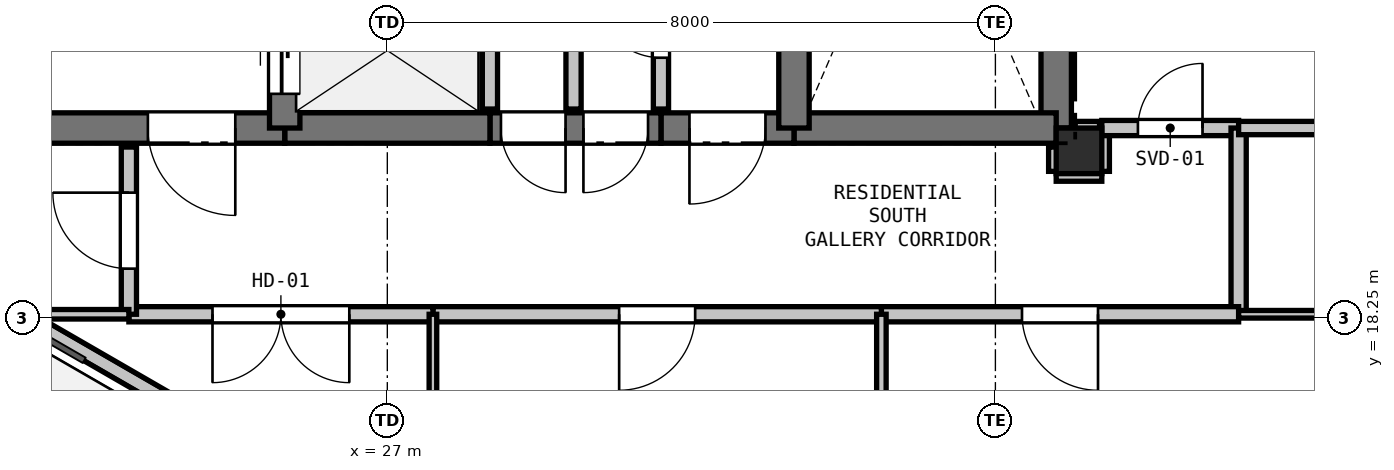
"""IFC4 building model, lengths in metres.
Left out: names, types, materials, properties, quantities, classifications, styles, units other than length and angle.
Written with IfcOpenShell. Run it as: python <this file> out.ifc"""

import sys

from ifc_helpers import new_model, si_unit, direction, frame, frame_2d, origin, origin_2d, place, context, subcontext, project, spatial, rectangle, extrude, element, fill, save


model = new_model("IFC4")
c1 = context("Model", 3, precision=1e-05, world=origin(), true_north=direction((0.0, 1.0)))
c2 = subcontext(c1, "Body", "Model", "MODEL_VIEW")
j1 = project(units=[si_unit("LENGTHUNIT", "METRE"), si_unit("PLANEANGLEUNIT", "RADIAN")], contexts=[c1])
p1 = place(None, origin())
s1 = spatial("IfcSite", under=j1, at=p1, CompositionType="ELEMENT")
p2 = place(p1, origin())
s2 = spatial("IfcBuilding", under=s1, at=p2, CompositionType="ELEMENT")
p3 = place(p2, frame((0.0, 0.0, 243.0)))
s3 = spatial("IfcBuildingStorey", under=s2, at=p3, CompositionType="ELEMENT", Elevation=243.0)
p4 = place(p3, frame((36.1, 20.45, 0.0), z_axis=(0.0, 0.0, 1.0), x_axis=(1.0, 0.0, 0.0)))
e1 = element("IfcColumn", 1, at=p4, inside=s3, PredefinedType="COLUMN", context=c2, shape_type="SweptSolid", body=[
    extrude(rectangle(XDim=0.6, YDim=0.6, at=origin_2d()), origin(), (0.0, 0.0, 1.0), 3.3),
])
p5 = place(p3, frame((27.191, 15.389, 0.0), z_axis=(0.0, 0.0, 1.0), x_axis=(-0.866019557082, 0.500010126649, 0.0)))
e2 = element("IfcWall", 2, at=p5, inside=s3, PredefinedType="PARAPET", context=c2, shape_type="SweptSolid", body=[
    extrude(rectangle(XDim=8.228, YDim=0.2, at=frame_2d((4.114, 0.0))), origin(), (0.0, 0.0, 1.0), 0.2),
])
p6 = place(p3, frame((35.8, 28.1, 0.0), z_axis=(0.0, 0.0, 1.0), x_axis=(0.0, -1.0, 0.0)))
e3 = element("IfcWall", 3, at=p6, inside=s3, PredefinedType="SHEAR", context=c2, shape_type="SweptSolid", body=[
    extrude(rectangle(XDim=7.35, YDim=0.4, at=frame_2d((3.675, 0.0))), origin(), (0.0, 0.0, 1.0), 3.08),
])
p7 = place(p3, frame((35.8, 20.75, 0.0), z_axis=(0.0, 0.0, 1.0), x_axis=(-1.0, 0.0, 0.0)))
e4 = element("IfcWall", 4, at=p7, inside=s3, PredefinedType="SHEAR", context=c2, shape_type="SweptSolid", body=[
    extrude(rectangle(XDim=3.45, YDim=0.4, at=frame_2d((1.725, 0.0))), origin(), (0.0, 0.0, 1.0), 3.08),
])
p8 = place(p3, frame((32.35, 20.75, 0.0), z_axis=(0.0, 0.0, 1.0), x_axis=(-1.0, 0.0, 0.0)))
e5 = element("IfcWall", 5, at=p8, inside=s3, PredefinedType="SHEAR", context=c2, shape_type="SweptSolid", body=[
    extrude(rectangle(XDim=1.75, YDim=0.4, at=frame_2d((0.875, 0.0))), origin(), (0.0, 0.0, 1.0), 3.08),
])
p9 = place(p8, frame((0.375, 0.0, 0.0)))
e6 = element("IfcOpeningElement", 6, at=p9, cuts=e5, PredefinedType="OPENING", context=c2, shape_type="SweptSolid", body=[
    extrude(rectangle(XDim=1.0, YDim=2.15, at=frame_2d((0.5, 1.075))), frame((0.0, 0.21, 0.0), z_axis=(0.0, -1.0, 0.0), x_axis=(1.0, 0.0, 0.0)), (0.0, 0.0, 1.0), 0.42),
])
p10 = place(p3, frame((30.6, 20.75, 0.0), z_axis=(0.0, 0.0, 1.0), x_axis=(-1.0, 0.0, 0.0)))
e7 = element("IfcWall", 7, at=p10, inside=s3, PredefinedType="SHEAR", context=c2, shape_type="SweptSolid", body=[
    extrude(rectangle(XDim=2.25, YDim=0.4, at=frame_2d((1.125, 0.0))), origin(), (0.0, 0.0, 1.0), 3.08),
])
p11 = place(p10, frame((1.255, 0.0, 0.0)))
e8 = element("IfcOpeningElement", 8, at=p11, cuts=e7, PredefinedType="OPENING", context=c2, shape_type="SweptSolid", body=[
    extrude(rectangle(XDim=0.85, YDim=2.1, at=frame_2d((0.425, 1.05))), frame((0.0, 0.21, 0.0), z_axis=(0.0, -1.0, 0.0), x_axis=(1.0, 0.0, 0.0)), (0.0, 0.0, 1.0), 0.42),
])
p12 = place(p10, frame((0.17, 0.0, 0.0)))
e9 = element("IfcOpeningElement", 9, at=p12, cuts=e7, PredefinedType="OPENING", context=c2, shape_type="SweptSolid", body=[
    extrude(rectangle(XDim=0.85, YDim=2.1, at=frame_2d((0.425, 1.05))), frame((0.0, 0.21, 0.0), z_axis=(0.0, -1.0, 0.0), x_axis=(1.0, 0.0, 0.0)), (0.0, 0.0, 1.0), 0.42),
])
p13 = place(p3, frame((28.35, 20.75, 0.0), z_axis=(0.0, 0.0, 1.0), x_axis=(-1.0, 0.0, 0.0)))
e10 = element("IfcWall", 10, at=p13, inside=s3, PredefinedType="SHEAR", context=c2, shape_type="SweptSolid", body=[
    extrude(rectangle(XDim=2.7, YDim=0.4, at=frame_2d((1.35, 0.0))), origin(), (0.0, 0.0, 1.0), 3.08),
])
p14 = place(p3, frame((25.65, 20.75, 0.0), z_axis=(0.0, 0.0, 1.0), x_axis=(-1.0, 0.0, 0.0)))
e11 = element("IfcWall", 11, at=p14, inside=s3, PredefinedType="SHEAR", context=c2, shape_type="SweptSolid", body=[
    extrude(rectangle(XDim=3.45, YDim=0.4, at=frame_2d((1.725, 0.0))), origin(), (0.0, 0.0, 1.0), 3.08),
])
p15 = place(p14, frame((0.65, 0.0, 0.0)))
e12 = element("IfcOpeningElement", 12, at=p15, cuts=e11, PredefinedType="OPENING", context=c2, shape_type="SweptSolid", body=[
    extrude(rectangle(XDim=1.15, YDim=2.15, at=frame_2d((0.575, 1.075))), frame((0.0, 0.21, 0.0), z_axis=(0.0, -1.0, 0.0), x_axis=(1.0, 0.0, 0.0)), (0.0, 0.0, 1.0), 0.42),
])
p16 = place(p3, frame((25.65, 20.75, 0.0), z_axis=(0.0, 0.0, 1.0), x_axis=(0.0, 1.0, 0.0)))
e13 = element("IfcWall", 13, at=p16, inside=s3, PredefinedType="SHEAR", context=c2, shape_type="SweptSolid", body=[
    extrude(rectangle(XDim=2.0, YDim=0.4, at=frame_2d((1.0, 0.0))), origin(), (0.0, 0.0, 1.0), 3.08),
])
p17 = place(p16, frame((0.45, 0.0, 0.0)))
e14 = element("IfcOpeningElement", 14, at=p17, cuts=e13, PredefinedType="OPENING", context=c2, shape_type="SweptSolid", body=[
    extrude(rectangle(XDim=1.1, YDim=2.15, at=frame_2d((0.55, 1.075))), frame((0.0, 0.21, 0.0), z_axis=(0.0, -1.0, 0.0), x_axis=(1.0, 0.0, 0.0)), (0.0, 0.0, 1.0), 0.42),
])
p18 = place(p3, frame((32.35, 20.75, 0.0), z_axis=(0.0, 0.0, 1.0), x_axis=(0.0, 1.0, 0.0)))
e15 = element("IfcWall", 15, at=p18, inside=s3, PredefinedType="SHEAR", context=c2, shape_type="SweptSolid", body=[
    extrude(rectangle(XDim=4.8, YDim=0.4, at=frame_2d((2.4, 0.0))), origin(), (0.0, 0.0, 1.0), 3.08),
])
p19 = place(p3, frame((28.35, 23.2, 0.0), z_axis=(0.0, 0.0, 1.0), x_axis=(0.0, -1.0, 0.0)))
e16 = element("IfcWall", 16, at=p19, inside=s3, PredefinedType="PARTITIONING", context=c2, shape_type="SweptSolid", body=[
    extrude(rectangle(XDim=2.2, YDim=0.2, at=frame_2d((1.1, 0.0))), origin(), (0.0, 0.0, 1.0), 3.08),
])
p20 = place(p3, frame((30.6, 21.0, 0.0), z_axis=(0.0, 0.0, 1.0), x_axis=(0.0, 1.0, 0.0)))
e17 = element("IfcWall", 17, at=p20, inside=s3, PredefinedType="PARTITIONING", context=c2, shape_type="SweptSolid", body=[
    extrude(rectangle(XDim=2.2, YDim=0.2, at=frame_2d((1.1, 0.0))), origin(), (0.0, 0.0, 1.0), 3.08),
])
p21 = place(p20, frame((0.675, 0.0, 0.0)))
e18 = element("IfcOpeningElement", 18, at=p21, cuts=e17, PredefinedType="OPENING", context=c2, shape_type="SweptSolid", body=[
    extrude(rectangle(XDim=0.85, YDim=2.1, at=frame_2d((0.425, 1.05))), frame((0.0, 0.11, 0.0), z_axis=(0.0, -1.0, 0.0), x_axis=(1.0, 0.0, 0.0)), (0.0, 0.0, 1.0), 0.22),
])
p22 = place(p3, frame((35.8, 20.15, 0.0), z_axis=(0.0, 0.0, 1.0), x_axis=(1.0, 0.0, 0.0)))
e19 = element("IfcWall", 19, at=p22, inside=s3, PredefinedType="PARTITIONING", context=c2, shape_type="SweptSolid", body=[
    extrude(rectangle(XDim=0.6, YDim=0.2, at=frame_2d((0.3, 0.0))), origin(), (0.0, 0.0, 1.0), 2.528),
])
p23 = place(p3, frame((36.4, 20.18, 0.0), z_axis=(0.0, 0.0, 1.0), x_axis=(0.0, 1.0, 0.0)))
e20 = element("IfcWall", 20, at=p23, inside=s3, PredefinedType="PARTITIONING", context=c2, shape_type="SweptSolid", body=[
    extrude(rectangle(XDim=0.57, YDim=0.2, at=frame_2d((0.285, 0.0))), origin(), (0.0, 0.0, 1.0), 3.08),
])
p24 = place(p3, frame((36.4, 20.75, 0.0), z_axis=(0.0, 0.0, 1.0), x_axis=(1.0, 0.0, 0.0)))
e21 = element("IfcWall", 21, at=p24, inside=s3, PredefinedType="PARTITIONING", context=c2, shape_type="SweptSolid", body=[
    extrude(rectangle(XDim=1.8, YDim=0.2, at=frame_2d((0.9, 0.0))), origin(), (0.0, 0.0, 1.0), 3.08),
])
p25 = place(p24, frame((0.475, 0.0, 0.0)))
e22 = element("IfcOpeningElement", 22, at=p25, cuts=e21, PredefinedType="OPENING", context=c2, shape_type="SweptSolid", body=[
    extrude(rectangle(XDim=0.85, YDim=2.1, at=frame_2d((0.425, 1.05))), frame((0.0, 0.11, 0.0), z_axis=(0.0, -1.0, 0.0), x_axis=(1.0, 0.0, 0.0)), (0.0, 0.0, 1.0), 0.22),
])
p26 = place(p3, frame((38.2, 20.75, 0.0), z_axis=(0.0, 0.0, 1.0), x_axis=(0.0, -1.0, 0.0)))
e23 = element("IfcWall", 23, at=p26, inside=s3, PredefinedType="PARTITIONING", context=c2, shape_type="SweptSolid", body=[
    extrude(rectangle(XDim=2.45, YDim=0.2, at=frame_2d((1.225, 0.0))), origin(), (0.0, 0.0, 1.0), 3.08),
])
p27 = place(p3, frame((38.2, 18.3, 0.0), z_axis=(0.0, 0.0, 1.0), x_axis=(-1.0, 0.0, 0.0)))
e24 = element("IfcWall", 24, at=p27, inside=s3, PredefinedType="PARTITIONING", context=c2, shape_type="SweptSolid", body=[
    extrude(rectangle(XDim=4.7, YDim=0.2, at=frame_2d((2.35, 0.0))), origin(), (0.0, 0.0, 1.0), 2.528),
])
p28 = place(p27, frame((1.85, 0.0, 0.0)))
e25 = element("IfcOpeningElement", 25, at=p28, cuts=e24, PredefinedType="OPENING", context=c2, shape_type="SweptSolid", body=[
    extrude(rectangle(XDim=1.0, YDim=2.15, at=frame_2d((0.5, 1.075))), frame((0.0, 0.11, 0.0), z_axis=(0.0, -1.0, 0.0), x_axis=(1.0, 0.0, 0.0)), (0.0, 0.0, 1.0), 0.22),
])
p29 = place(p3, frame((33.5, 18.3, 0.0), z_axis=(0.0, 0.0, 1.0), x_axis=(-1.0, 0.0, 0.0)))
e26 = element("IfcWall", 26, at=p29, inside=s3, PredefinedType="PARTITIONING", context=c2, shape_type="SweptSolid", body=[
    extrude(rectangle(XDim=5.9, YDim=0.2, at=frame_2d((2.95, 0.0))), origin(), (0.0, 0.0, 1.0), 3.08),
])
p30 = place(p29, frame((2.45, 0.0, 0.0)))
e27 = element("IfcOpeningElement", 27, at=p30, cuts=e26, PredefinedType="OPENING", context=c2, shape_type="SweptSolid", body=[
    extrude(rectangle(XDim=1.0, YDim=2.15, at=frame_2d((0.5, 1.075))), frame((0.0, 0.11, 0.0), z_axis=(0.0, -1.0, 0.0), x_axis=(1.0, 0.0, 0.0)), (0.0, 0.0, 1.0), 0.22),
])
p31 = place(p3, frame((27.6, 18.3, 0.0), z_axis=(0.0, 0.0, 1.0), x_axis=(-1.0, 0.0, 0.0)))
e28 = element("IfcWall", 28, at=p31, inside=s3, PredefinedType="PARTITIONING", context=c2, shape_type="SweptSolid", body=[
    extrude(rectangle(XDim=4.0, YDim=0.2, at=frame_2d((2.0, 0.0))), origin(), (0.0, 0.0, 1.0), 2.365),
])
p32 = place(p31, frame((1.1, 0.0, 0.0)))
e29 = element("IfcOpeningElement", 29, at=p32, cuts=e28, PredefinedType="OPENING", context=c2, shape_type="SweptSolid", body=[
    extrude(rectangle(XDim=1.8, YDim=2.2, at=frame_2d((0.9, 1.1))), frame((0.0, 0.11, 0.0), z_axis=(0.0, -1.0, 0.0), x_axis=(1.0, 0.0, 0.0)), (0.0, 0.0, 1.0), 0.22),
])
p33 = place(p3, frame((23.6, 18.3, 0.0), z_axis=(0.0, 0.0, 1.0), x_axis=(0.0, 1.0, 0.0)))
e30 = element("IfcWall", 30, at=p33, inside=s3, PredefinedType="PARTITIONING", context=c2, shape_type="SweptSolid", body=[
    extrude(rectangle(XDim=2.2, YDim=0.2, at=frame_2d((1.1, 0.0))), origin(), (0.0, 0.0, 1.0), 2.528),
])
p34 = place(p33, frame((0.6, 0.0, 0.0)))
e31 = element("IfcOpeningElement", 31, at=p34, cuts=e30, PredefinedType="OPENING", context=c2, shape_type="SweptSolid", body=[
    extrude(rectangle(XDim=1.0, YDim=2.15, at=frame_2d((0.5, 1.075))), frame((0.0, 0.11, 0.0), z_axis=(0.0, -1.0, 0.0), x_axis=(1.0, 0.0, 0.0)), (0.0, 0.0, 1.0), 0.22),
])
p35 = place(p3, frame((35.8, 20.5, 0.0), z_axis=(0.0, 0.0, 1.0), x_axis=(0.0, -1.0, 0.0)))
e32 = element("IfcWall", 32, at=p35, inside=s3, PredefinedType="PARTITIONING", context=c2, shape_type="SweptSolid", body=[
    extrude(rectangle(XDim=0.32, YDim=0.2, at=frame_2d((0.16, 0.0))), origin(), (0.0, 0.0, 1.0), 2.605),
])
p36 = place(p3, frame((39.606, 20.75, 0.0), z_axis=(0.0, 0.0, 1.0), x_axis=(-1.0, 0.0, 0.0)))
e33 = element("IfcWall", 33, at=p36, inside=s3, PredefinedType="PLUMBINGWALL", context=c2, shape_type="SweptSolid", body=[
    extrude(rectangle(XDim=1.406, YDim=0.175, at=frame_2d((0.703, 0.0))), origin(), (0.0, 0.0, 1.0), 2.365),
])
p37 = place(p3, frame((36.37, 20.75, 0.0), z_axis=(0.0, 0.0, 1.0), x_axis=(-1.0, 0.0, 0.0)))
e34 = element("IfcWall", 34, at=p37, inside=s3, PredefinedType="PLUMBINGWALL", context=c2, shape_type="SweptSolid", body=[
    extrude(rectangle(XDim=0.32, YDim=0.175, at=frame_2d((0.16, 0.0))), origin(), (0.0, 0.0, 1.0), 2.605),
])
p38 = place(p3, frame((29.45, 23.2, 0.0), z_axis=(0.0, 0.0, 1.0), x_axis=(0.0, -1.0, 0.0)))
e35 = element("IfcWall", 35, at=p38, inside=s3, PredefinedType="PARTITIONING", context=c2, shape_type="SweptSolid", body=[
    extrude(rectangle(XDim=2.2, YDim=0.2, at=frame_2d((1.1, 0.0))), origin(), (0.0, 0.0, 1.0), 3.08),
])
p39 = place(p3, frame((22.223, 18.3, 0.0), z_axis=(0.0, 0.0, 1.0), x_axis=(1.0, 0.0, 0.0)))
e36 = element("IfcWall", 36, at=p39, inside=s3, PredefinedType="PARTITIONING", context=c2, shape_type="SweptSolid", body=[
    extrude(rectangle(XDim=1.377, YDim=0.125, at=frame_2d((0.688, 0.0))), origin(), (0.0, 0.0, 1.0), 2.365),
])
p40 = place(p3, frame((27.6, 18.3, 0.0), z_axis=(0.0, 0.0, 1.0), x_axis=(0.0, -1.0, 0.0)))
e37 = element("IfcWall", 37, at=p40, inside=s3, PredefinedType="PARTITIONING", context=c2, shape_type="SweptSolid", body=[
    extrude(rectangle(XDim=2.795, YDim=0.1, at=frame_2d((1.398, 0.0))), origin(), (0.0, 0.0, 1.0), 2.365),
])
p41 = place(p3, frame((33.5, 18.3, 0.0), z_axis=(0.0, 0.0, 1.0), x_axis=(0.0, -1.0, 0.0)))
e38 = element("IfcWall", 38, at=p41, inside=s3, PredefinedType="PARTITIONING", context=c2, shape_type="SweptSolid", body=[
    extrude(rectangle(XDim=6.395, YDim=0.125, at=frame_2d((3.198, 0.0))), origin(), (0.0, 0.0, 1.0), 2.805),
])
p42 = place(p3, frame((38.2, 18.3, 0.0), z_axis=(0.0, 0.0, 1.0), x_axis=(1.0, 0.0, 0.0)))
e39 = element("IfcWall", 39, at=p42, inside=s3, PredefinedType="PARTITIONING", context=c2, shape_type="SweptSolid", body=[
    extrude(rectangle(XDim=1.406, YDim=0.1, at=frame_2d((0.703, 0.0))), origin(), (0.0, 0.0, 1.0), 2.365),
])
p43 = place(p9, origin())
e40 = element("IfcDoor", 40, at=p43, inside=s3, OperationType="SINGLE_SWING_RIGHT", PredefinedType="DOOR", context=c2, shape_type="SweptSolid", body=[
    extrude(rectangle(XDim=1.0, YDim=2.15, at=frame_2d((0.5, 1.075))), frame((0.0, 0.025, 0.0), z_axis=(0.0, -1.0, 0.0), x_axis=(1.0, 0.0, 0.0)), (0.0, 0.0, 1.0), 0.05),
])
fill(e6, e40)
p44 = place(p17, origin())
e41 = element("IfcDoor", 41, at=p44, inside=s3, OperationType="SLIDING_TO_LEFT", PredefinedType="DOOR", context=c2, shape_type="SweptSolid", body=[
    extrude(rectangle(XDim=1.1, YDim=2.15, at=frame_2d((0.55, 1.075))), frame((0.0, 0.025, 0.0), z_axis=(0.0, -1.0, 0.0), x_axis=(1.0, 0.0, 0.0)), (0.0, 0.0, 1.0), 0.05),
])
fill(e14, e41)
p45 = place(p15, origin())
e42 = element("IfcDoor", 42, at=p45, inside=s3, OperationType="SINGLE_SWING_LEFT", PredefinedType="DOOR", context=c2, shape_type="SweptSolid", body=[
    extrude(rectangle(XDim=1.15, YDim=2.15, at=frame_2d((0.575, 1.075))), frame((0.0, 0.025, 0.0), z_axis=(0.0, -1.0, 0.0), x_axis=(1.0, 0.0, 0.0)), (0.0, 0.0, 1.0), 0.05),
])
fill(e12, e42)
p46 = place(p21, origin())
e43 = element("IfcDoor", 43, at=p46, inside=s3, OperationType="SINGLE_SWING_RIGHT", PredefinedType="DOOR", context=c2, shape_type="SweptSolid", body=[
    extrude(rectangle(XDim=0.85, YDim=2.1, at=frame_2d((0.425, 1.05))), frame((0.0, 0.025, 0.0), z_axis=(0.0, -1.0, 0.0), x_axis=(1.0, 0.0, 0.0)), (0.0, 0.0, 1.0), 0.05),
])
fill(e18, e43)
p47 = place(p25, origin())
e44 = element("IfcDoor", 44, at=p47, inside=s3, OperationType="SINGLE_SWING_RIGHT", PredefinedType="DOOR", context=c2, shape_type="SweptSolid", body=[
    extrude(rectangle(XDim=0.85, YDim=2.1, at=frame_2d((0.425, 1.05))), frame((0.0, 0.025, 0.0), z_axis=(0.0, -1.0, 0.0), x_axis=(1.0, 0.0, 0.0)), (0.0, 0.0, 1.0), 0.05),
])
fill(e22, e44)
p48 = place(p11, origin())
e45 = element("IfcDoor", 45, at=p48, inside=s3, OperationType="SINGLE_SWING_LEFT", PredefinedType="DOOR", context=c2, shape_type="SweptSolid", body=[
    extrude(rectangle(XDim=0.85, YDim=2.1, at=frame_2d((0.425, 1.05))), frame((0.0, 0.025, 0.0), z_axis=(0.0, -1.0, 0.0), x_axis=(1.0, 0.0, 0.0)), (0.0, 0.0, 1.0), 0.05),
])
fill(e8, e45)
p49 = place(p12, origin())
e46 = element("IfcDoor", 46, at=p49, inside=s3, OperationType="SINGLE_SWING_RIGHT", PredefinedType="DOOR", context=c2, shape_type="SweptSolid", body=[
    extrude(rectangle(XDim=0.85, YDim=2.1, at=frame_2d((0.425, 1.05))), frame((0.0, 0.025, 0.0), z_axis=(0.0, -1.0, 0.0), x_axis=(1.0, 0.0, 0.0)), (0.0, 0.0, 1.0), 0.05),
])
fill(e9, e46)
p50 = place(p32, origin())
e47 = element("IfcDoor", 47, at=p50, inside=s3, OperationType="DOUBLE_DOOR_SINGLE_SWING", PredefinedType="DOOR", context=c2, shape_type="SweptSolid", body=[
    extrude(rectangle(XDim=1.8, YDim=2.2, at=frame_2d((0.9, 1.1))), frame((0.0, 0.025, 0.0), z_axis=(0.0, -1.0, 0.0), x_axis=(1.0, 0.0, 0.0)), (0.0, 0.0, 1.0), 0.05),
])
fill(e29, e47)
p51 = place(p30, origin())
e48 = element("IfcDoor", 48, at=p51, inside=s3, OperationType="SINGLE_SWING_RIGHT", PredefinedType="DOOR", context=c2, shape_type="SweptSolid", body=[
    extrude(rectangle(XDim=1.0, YDim=2.15, at=frame_2d((0.5, 1.075))), frame((0.0, 0.025, 0.0), z_axis=(0.0, -1.0, 0.0), x_axis=(1.0, 0.0, 0.0)), (0.0, 0.0, 1.0), 0.05),
])
fill(e27, e48)
p52 = place(p28, origin())
e49 = element("IfcDoor", 49, at=p52, inside=s3, OperationType="SINGLE_SWING_LEFT", PredefinedType="DOOR", context=c2, shape_type="SweptSolid", body=[
    extrude(rectangle(XDim=1.0, YDim=2.15, at=frame_2d((0.5, 1.075))), frame((0.0, 0.025, 0.0), z_axis=(0.0, -1.0, 0.0), x_axis=(1.0, 0.0, 0.0)), (0.0, 0.0, 1.0), 0.05),
])
fill(e25, e49)
p53 = place(p34, origin())
e50 = element("IfcDoor", 50, at=p53, inside=s3, OperationType="SINGLE_SWING_RIGHT", PredefinedType="DOOR", context=c2, shape_type="SweptSolid", body=[
    extrude(rectangle(XDim=1.0, YDim=2.15, at=frame_2d((0.5, 1.075))), frame((0.0, 0.025, 0.0), z_axis=(0.0, -1.0, 0.0), x_axis=(1.0, 0.0, 0.0)), (0.0, 0.0, 1.0), 0.05),
])
fill(e31, e50)
save(model, sys.argv[1])
